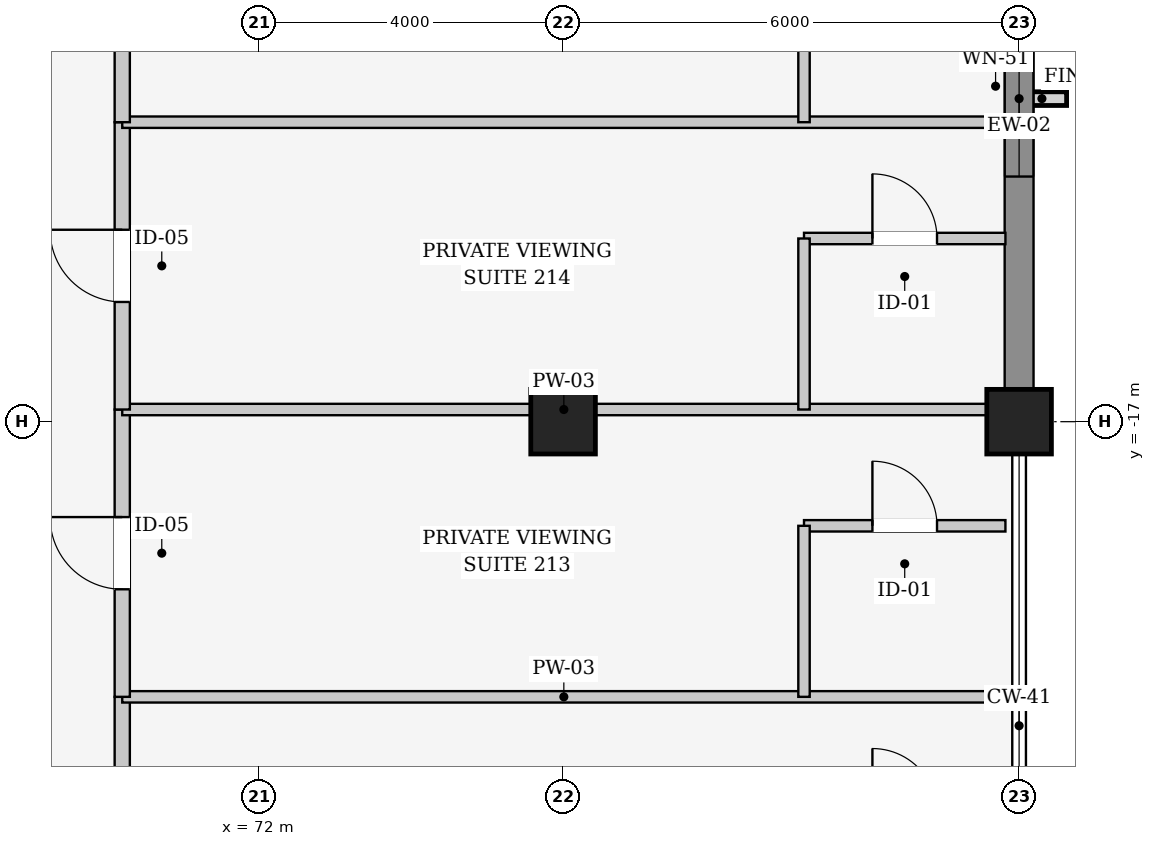
"""IFC4 building model, lengths in metres.
Left out: names, types, materials, properties, quantities, classifications, styles, units other than length and angle.
Written with IfcOpenShell. Run it as: python <this file> out.ifc"""

import sys

from ifc_helpers import new_model, si_unit, direction, frame, frame_2d, origin, origin_2d, place, context, subcontext, project, spatial, rectangle, extrude, element, fill, save


model = new_model("IFC4")
c1 = context("Model", 3, precision=1e-05, world=origin(), true_north=direction((0.0, 1.0)))
c2 = subcontext(c1, "Body", "Model", "MODEL_VIEW")
j1 = project(units=[si_unit("LENGTHUNIT", "METRE"), si_unit("PLANEANGLEUNIT", "RADIAN")], contexts=[c1])
p1 = place(None, origin())
s1 = spatial("IfcSite", under=j1, at=p1, CompositionType="ELEMENT")
p2 = place(p1, origin())
s2 = spatial("IfcBuilding", under=s1, at=p2, CompositionType="ELEMENT")
p3 = place(p2, frame((0.0, 0.0, 11.4)))
s3 = spatial("IfcBuildingStorey", under=s2, at=p3, CompositionType="ELEMENT", Elevation=11.4)
for number, where, z_axis, x_axis in (
    (1, (76.0, -17.0, 0.0), (0.0, 0.0, 1.0), (1.0, 0.0, 0.0)),
    (2, (82.0, -17.0, 0.0), (0.0, 0.0, 1.0), (1.0, 0.0, 0.0)),
):
    element("IfcColumn", number, at=place(p3, frame(where, z_axis=z_axis, x_axis=x_axis)), inside=s3, PredefinedType="COLUMN", context=c2, shape_type="SweptSolid", body=[
        extrude(rectangle(XDim=0.85, YDim=0.85, at=origin_2d()), origin(), (0.0, 0.0, 1.0), 4.8),
    ])
p4 = place(p3, frame((82.0, -8.907, 0.0), z_axis=(0.0, 0.0, 1.0), x_axis=(0.0, -1.0, 0.0)))
e3 = element("IfcWall", 3, at=p4, inside=s3, PredefinedType="SOLIDWALL", context=c2, shape_type="SweptSolid", body=[
    extrude(rectangle(XDim=7.686, YDim=0.38, at=frame_2d((3.843, 0.0))), origin(), (0.0, 0.0, 1.0), 3.76),
])
p5 = place(p4, frame((2.818, 0.0, 0.9)))
e4 = element("IfcOpeningElement", 4, at=p5, cuts=e3, PredefinedType="OPENING", context=c2, shape_type="SweptSolid", body=[
    extrude(rectangle(XDim=2.05, YDim=2.5, at=frame_2d((1.025, 1.25))), frame((0.0, 0.2, 0.0), z_axis=(0.0, -1.0, 0.0), x_axis=(1.0, 0.0, 0.0)), (0.0, 0.0, 1.0), 0.4),
])
p6 = place(p3, frame((70.2, -24.4, 0.0), z_axis=(0.0, 0.0, 1.0), x_axis=(0.0, 1.0, 0.0)))
e5 = element("IfcWall", 5, at=p6, inside=s3, PredefinedType="PARTITIONING", context=c2, shape_type="SweptSolid", body=[
    extrude(rectangle(XDim=3.78, YDim=0.2, at=frame_2d((1.89, 0.0))), origin(), (0.0, 0.0, 1.0), 4.14),
])
p7 = place(p6, frame((1.415, 0.0, 0.0)))
e6 = element("IfcOpeningElement", 6, at=p7, cuts=e5, PredefinedType="OPENING", context=c2, shape_type="SweptSolid", body=[
    extrude(rectangle(XDim=0.95, YDim=2.25, at=frame_2d((0.475, 1.125))), frame((0.0, 0.11, 0.0), z_axis=(0.0, -1.0, 0.0), x_axis=(1.0, 0.0, 0.0)), (0.0, 0.0, 1.0), 0.22),
])
p8 = place(p3, frame((70.2, -20.62, 0.0), z_axis=(0.0, 0.0, 1.0), x_axis=(1.0, 0.0, 0.0)))
e7 = element("IfcWall", 7, at=p8, inside=s3, PredefinedType="PARTITIONING", context=c2, shape_type="SweptSolid", body=[
    extrude(rectangle(XDim=11.62, YDim=0.15, at=frame_2d((5.81, 0.0))), origin(), (0.0, 0.0, 1.0), 3.845),
])
p9 = place(p3, frame((79.17, -18.37, 0.0), z_axis=(0.0, 0.0, 1.0), x_axis=(1.0, 0.0, 0.0)))
e8 = element("IfcWall", 8, at=p9, inside=s3, PredefinedType="PARTITIONING", context=c2, shape_type="SweptSolid", body=[
    extrude(rectangle(XDim=2.65, YDim=0.15, at=frame_2d((1.325, 0.0))), origin(), (0.0, 0.0, 1.0), 3.845),
])
p10 = place(p9, frame((0.9, 0.0, 0.0)))
e9 = element("IfcOpeningElement", 9, at=p10, cuts=e8, PredefinedType="OPENING", context=c2, shape_type="SweptSolid", body=[
    extrude(rectangle(XDim=0.85, YDim=2.15, at=frame_2d((0.425, 1.075))), frame((0.0, 0.085, 0.0), z_axis=(0.0, -1.0, 0.0), x_axis=(1.0, 0.0, 0.0)), (0.0, 0.0, 1.0), 0.17),
])
p11 = place(p3, frame((79.17, -20.62, 0.0), z_axis=(0.0, 0.0, 1.0), x_axis=(0.0, 1.0, 0.0)))
e10 = element("IfcWall", 10, at=p11, inside=s3, PredefinedType="PARTITIONING", context=c2, shape_type="SweptSolid", body=[
    extrude(rectangle(XDim=2.25, YDim=0.15, at=frame_2d((1.125, 0.0))), origin(), (0.0, 0.0, 1.0), 4.44),
])
p12 = place(p3, frame((70.2, -20.62, 0.0), z_axis=(0.0, 0.0, 1.0), x_axis=(0.0, 1.0, 0.0)))
e11 = element("IfcWall", 11, at=p12, inside=s3, PredefinedType="PARTITIONING", context=c2, shape_type="SweptSolid", body=[
    extrude(rectangle(XDim=3.78, YDim=0.2, at=frame_2d((1.89, 0.0))), origin(), (0.0, 0.0, 1.0), 3.545),
])
p13 = place(p12, frame((1.415, 0.0, 0.0)))
e12 = element("IfcOpeningElement", 12, at=p13, cuts=e11, PredefinedType="OPENING", context=c2, shape_type="SweptSolid", body=[
    extrude(rectangle(XDim=0.95, YDim=2.25, at=frame_2d((0.475, 1.125))), frame((0.0, 0.11, 0.0), z_axis=(0.0, -1.0, 0.0), x_axis=(1.0, 0.0, 0.0)), (0.0, 0.0, 1.0), 0.22),
])
p14 = place(p3, frame((70.2, -16.84, 0.0), z_axis=(0.0, 0.0, 1.0), x_axis=(1.0, 0.0, 0.0)))
e13 = element("IfcWall", 13, at=p14, inside=s3, PredefinedType="PARTITIONING", context=c2, shape_type="SweptSolid", body=[
    extrude(rectangle(XDim=11.62, YDim=0.15, at=frame_2d((5.81, 0.0))), origin(), (0.0, 0.0, 1.0), 3.545),
])
p15 = place(p3, frame((79.17, -14.59, 0.0), z_axis=(0.0, 0.0, 1.0), x_axis=(1.0, 0.0, 0.0)))
e14 = element("IfcWall", 14, at=p15, inside=s3, PredefinedType="PARTITIONING", context=c2, shape_type="SweptSolid", body=[
    extrude(rectangle(XDim=2.65, YDim=0.15, at=frame_2d((1.325, 0.0))), origin(), (0.0, 0.0, 1.0), 3.845),
])
p16 = place(p15, frame((0.9, 0.0, 0.0)))
e15 = element("IfcOpeningElement", 15, at=p16, cuts=e14, PredefinedType="OPENING", context=c2, shape_type="SweptSolid", body=[
    extrude(rectangle(XDim=0.85, YDim=2.15, at=frame_2d((0.425, 1.075))), frame((0.0, 0.085, 0.0), z_axis=(0.0, -1.0, 0.0), x_axis=(1.0, 0.0, 0.0)), (0.0, 0.0, 1.0), 0.17),
])
p17 = place(p3, frame((79.17, -16.84, 0.0), z_axis=(0.0, 0.0, 1.0), x_axis=(0.0, 1.0, 0.0)))
e16 = element("IfcWall", 16, at=p17, inside=s3, PredefinedType="PARTITIONING", context=c2, shape_type="SweptSolid", body=[
    extrude(rectangle(XDim=2.25, YDim=0.15, at=frame_2d((1.125, 0.0))), origin(), (0.0, 0.0, 1.0), 3.745),
])
p18 = place(p3, frame((70.2, -16.84, 0.0), z_axis=(0.0, 0.0, 1.0), x_axis=(0.0, 1.0, 0.0)))
e17 = element("IfcWall", 17, at=p18, inside=s3, PredefinedType="PARTITIONING", context=c2, shape_type="SweptSolid", body=[
    extrude(rectangle(XDim=3.78, YDim=0.2, at=frame_2d((1.89, 0.0))), origin(), (0.0, 0.0, 1.0), 3.545),
])
p19 = place(p18, frame((1.415, 0.0, 0.0)))
e18 = element("IfcOpeningElement", 18, at=p19, cuts=e17, PredefinedType="OPENING", context=c2, shape_type="SweptSolid", body=[
    extrude(rectangle(XDim=0.95, YDim=2.25, at=frame_2d((0.475, 1.125))), frame((0.0, 0.11, 0.0), z_axis=(0.0, -1.0, 0.0), x_axis=(1.0, 0.0, 0.0)), (0.0, 0.0, 1.0), 0.22),
])
p20 = place(p3, frame((70.2, -13.06, 0.0), z_axis=(0.0, 0.0, 1.0), x_axis=(1.0, 0.0, 0.0)))
e19 = element("IfcWall", 19, at=p20, inside=s3, PredefinedType="PARTITIONING", context=c2, shape_type="SweptSolid", body=[
    extrude(rectangle(XDim=11.62, YDim=0.15, at=frame_2d((5.81, 0.0))), origin(), (0.0, 0.0, 1.0), 3.845),
])
p21 = place(p3, frame((79.17, -13.06, 0.0), z_axis=(0.0, 0.0, 1.0), x_axis=(0.0, 1.0, 0.0)))
e20 = element("IfcWall", 20, at=p21, inside=s3, PredefinedType="PARTITIONING", context=c2, shape_type="SweptSolid", body=[
    extrude(rectangle(XDim=2.25, YDim=0.15, at=frame_2d((1.125, 0.0))), origin(), (0.0, 0.0, 1.0), 4.14),
])
p22 = place(p3, frame((70.2, -13.06, 0.0), z_axis=(0.0, 0.0, 1.0), x_axis=(0.0, 1.0, 0.0)))
e21 = element("IfcWall", 21, at=p22, inside=s3, PredefinedType="PARTITIONING", context=c2, shape_type="SweptSolid", body=[
    extrude(rectangle(XDim=3.78, YDim=0.2, at=frame_2d((1.89, 0.0))), origin(), (0.0, 0.0, 1.0), 4.14),
])
p23 = place(p22, frame((1.415, 0.0, 0.0)))
e22 = element("IfcOpeningElement", 22, at=p23, cuts=e21, PredefinedType="OPENING", context=c2, shape_type="SweptSolid", body=[
    extrude(rectangle(XDim=0.95, YDim=2.25, at=frame_2d((0.475, 1.125))), frame((0.0, 0.11, 0.0), z_axis=(0.0, -1.0, 0.0), x_axis=(1.0, 0.0, 0.0)), (0.0, 0.0, 1.0), 0.22),
])
p24 = place(p5, origin())
e23 = element("IfcWindow", 23, at=p24, inside=s3, PartitioningType="SINGLE_PANEL", PredefinedType="WINDOW", context=c2, shape_type="SweptSolid", body=[
    extrude(rectangle(XDim=2.05, YDim=2.5, at=frame_2d((1.025, 1.25))), frame((0.0, 0.03, 0.0), z_axis=(0.0, -1.0, 0.0), x_axis=(1.0, 0.0, 0.0)), (0.0, 0.0, 1.0), 0.06),
])
fill(e4, e23)
p25 = place(p10, origin())
e24 = element("IfcDoor", 24, at=p25, inside=s3, OperationType="SINGLE_SWING_LEFT", PredefinedType="DOOR", context=c2, shape_type="SweptSolid", body=[
    extrude(rectangle(XDim=0.85, YDim=2.15, at=frame_2d((0.425, 1.075))), frame((0.0, 0.025, 0.0), z_axis=(0.0, -1.0, 0.0), x_axis=(1.0, 0.0, 0.0)), (0.0, 0.0, 1.0), 0.05),
])
fill(e9, e24)
p26 = place(p13, origin())
e25 = element("IfcDoor", 25, at=p26, inside=s3, OperationType="SINGLE_SWING_RIGHT", PredefinedType="DOOR", context=c2, shape_type="SweptSolid", body=[
    extrude(rectangle(XDim=0.95, YDim=2.25, at=frame_2d((0.475, 1.125))), frame((0.0, 0.025, 0.0), z_axis=(0.0, -1.0, 0.0), x_axis=(1.0, 0.0, 0.0)), (0.0, 0.0, 1.0), 0.05),
])
fill(e12, e25)
p27 = place(p16, origin())
e26 = element("IfcDoor", 26, at=p27, inside=s3, OperationType="SINGLE_SWING_LEFT", PredefinedType="DOOR", context=c2, shape_type="SweptSolid", body=[
    extrude(rectangle(XDim=0.85, YDim=2.15, at=frame_2d((0.425, 1.075))), frame((0.0, 0.025, 0.0), z_axis=(0.0, -1.0, 0.0), x_axis=(1.0, 0.0, 0.0)), (0.0, 0.0, 1.0), 0.05),
])
fill(e15, e26)
p28 = place(p19, origin())
e27 = element("IfcDoor", 27, at=p28, inside=s3, OperationType="SINGLE_SWING_RIGHT", PredefinedType="DOOR", context=c2, shape_type="SweptSolid", body=[
    extrude(rectangle(XDim=0.95, YDim=2.25, at=frame_2d((0.475, 1.125))), frame((0.0, 0.025, 0.0), z_axis=(0.0, -1.0, 0.0), x_axis=(1.0, 0.0, 0.0)), (0.0, 0.0, 1.0), 0.05),
])
fill(e18, e27)
save(model, sys.argv[1])
